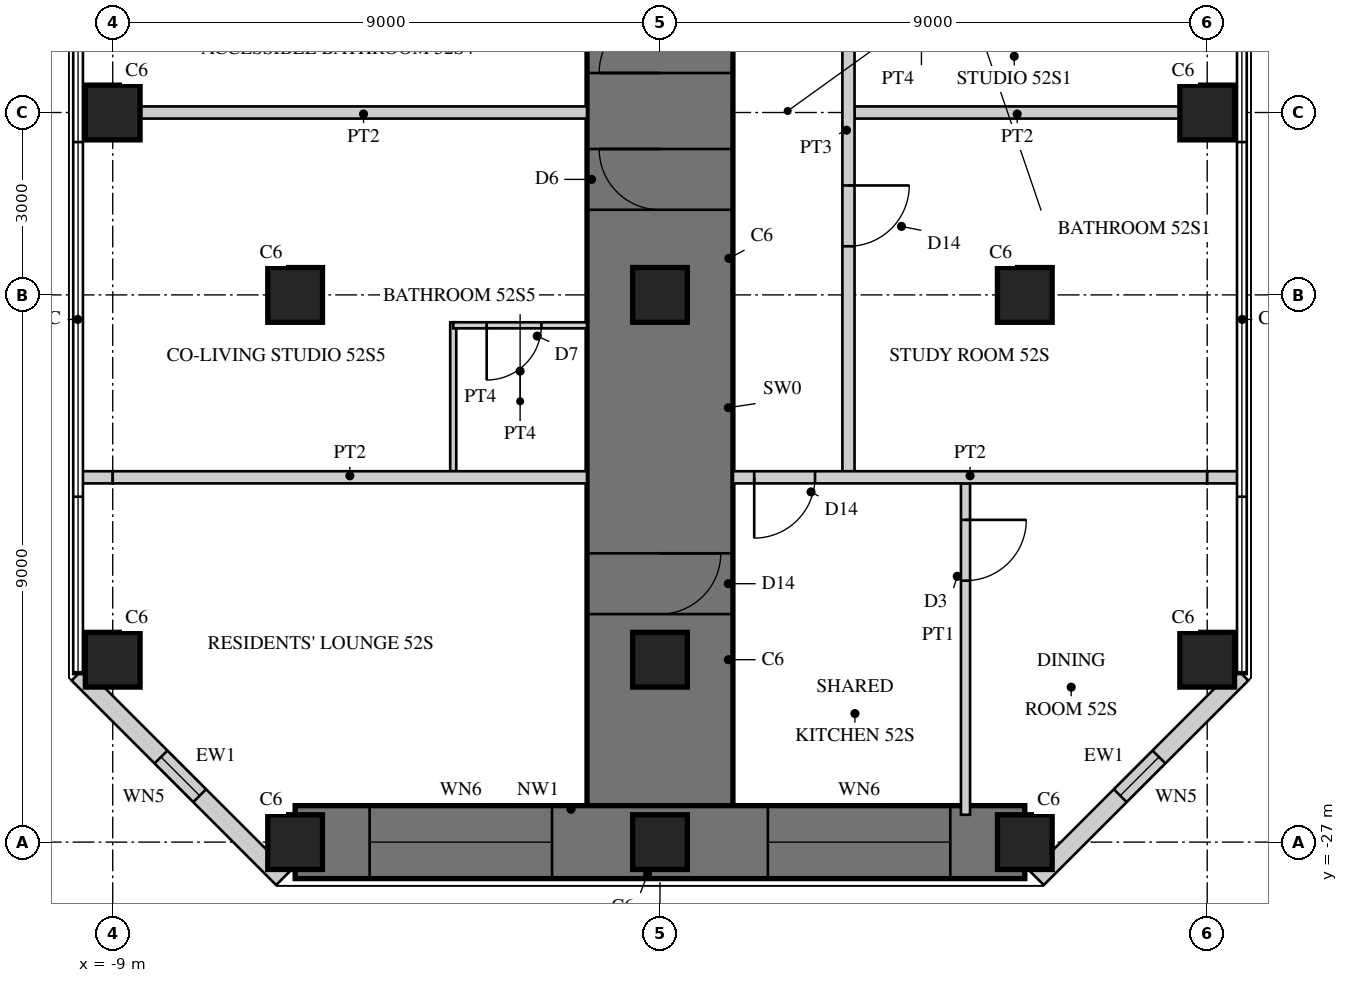
"""IFC4 building model, lengths in metres.
Left out: names, types, materials, properties, quantities, classifications, styles, units other than length and angle.
Written with IfcOpenShell. Run it as: python <this file> out.ifc"""

import sys

from ifc_helpers import new_model, si_unit, direction, frame, frame_2d, origin, origin_2d, place, context, subcontext, project, spatial, rectangle, hollow_rectangle, extrude, element, fill, save


model = new_model("IFC4")
c1 = context("Model", 3, precision=1e-05, world=origin(), true_north=direction((0.0, 1.0)))
c2 = subcontext(c1, "Body", "Model", "MODEL_VIEW")
j1 = project(units=[si_unit("LENGTHUNIT", "METRE"), si_unit("PLANEANGLEUNIT", "RADIAN")], contexts=[c1])
p1 = place(None, origin())
s1 = spatial("IfcSite", under=j1, at=p1, CompositionType="ELEMENT")
p2 = place(p1, origin())
s2 = spatial("IfcBuilding", under=s1, at=p2, CompositionType="ELEMENT")
p3 = place(p2, frame((0.0, 0.0, 206.9)))
s3 = spatial("IfcBuildingStorey", under=s2, at=p3, CompositionType="ELEMENT", Elevation=206.9)
p4 = place(p3, frame((0.0, -13.05, 0.0), z_axis=(0.0, 0.0, 1.0), x_axis=(0.0, -1.0, 0.0)))
e1 = element("IfcWall", 1, at=p4, inside=s3, PredefinedType="SHEAR", context=c2, shape_type="SweptSolid", body=[
    extrude(rectangle(XDim=13.95, YDim=2.4, at=frame_2d((6.975, 0.0))), origin(), (0.0, 0.0, 1.0), 3.4),
])
p5 = place(p4, frame((0.3, 0.0, 0.0)))
e2 = element("IfcOpeningElement", 2, at=p5, cuts=e1, PredefinedType="OPENING", context=c2, shape_type="SweptSolid", body=[
    extrude(rectangle(XDim=1.0, YDim=2.15, at=frame_2d((0.5, 1.075))), frame((0.0, 1.21, 0.0), z_axis=(0.0, -1.0, 0.0), x_axis=(1.0, 0.0, 0.0)), (0.0, 0.0, 1.0), 2.42),
])
p6 = place(p4, frame((2.55, 0.0, 0.0)))
e3 = element("IfcOpeningElement", 3, at=p6, cuts=e1, PredefinedType="OPENING", context=c2, shape_type="SweptSolid", body=[
    extrude(rectangle(XDim=1.0, YDim=2.15, at=frame_2d((0.5, 1.075))), frame((0.0, 1.21, 0.0), z_axis=(0.0, -1.0, 0.0), x_axis=(1.0, 0.0, 0.0)), (0.0, 0.0, 1.0), 2.42),
])
p7 = place(p4, frame((9.2, 0.0, 0.0)))
e4 = element("IfcOpeningElement", 4, at=p7, cuts=e1, PredefinedType="OPENING", context=c2, shape_type="SweptSolid", body=[
    extrude(rectangle(XDim=1.0, YDim=2.2, at=frame_2d((0.5, 1.1))), frame((0.0, 1.21, 0.0), z_axis=(0.0, -1.0, 0.0), x_axis=(1.0, 0.0, 0.0)), (0.0, 0.0, 1.0), 2.42),
])
p8 = place(p3, frame((-6.0, -27.0, 0.0), z_axis=(0.0, 0.0, 1.0), x_axis=(1.0, 0.0, 0.0)))
e5 = element("IfcWall", 5, at=p8, inside=s3, PredefinedType="SHEAR", context=c2, shape_type="SweptSolid", body=[
    extrude(rectangle(XDim=12.0, YDim=1.2, at=frame_2d((6.0, 0.0))), origin(), (0.0, 0.0, 1.0), 3.4),
])
p9 = place(p8, frame((1.225, 0.0, 0.6)))
e6 = element("IfcOpeningElement", 6, at=p9, cuts=e5, PredefinedType="OPENING", context=c2, shape_type="SweptSolid", body=[
    extrude(rectangle(XDim=3.0, YDim=2.4, at=frame_2d((1.5, 1.2))), frame((0.0, 0.61, 0.0), z_axis=(0.0, -1.0, 0.0), x_axis=(1.0, 0.0, 0.0)), (0.0, 0.0, 1.0), 1.22),
])
p10 = place(p8, frame((7.775, 0.0, 0.6)))
e7 = element("IfcOpeningElement", 7, at=p10, cuts=e5, PredefinedType="OPENING", context=c2, shape_type="SweptSolid", body=[
    extrude(rectangle(XDim=3.0, YDim=2.4, at=frame_2d((1.5, 1.2))), frame((0.0, 0.61, 0.0), z_axis=(0.0, -1.0, 0.0), x_axis=(1.0, 0.0, 0.0)), (0.0, 0.0, 1.0), 1.22),
])
for number, where, z_axis, x_axis in (
    (8, (-9.0, -15.0, 0.0), (0.0, 0.0, 1.0), (1.0, 0.0, 0.0)),
    (9, (-9.0, -24.0, 0.0), (0.0, 0.0, 1.0), (1.0, 0.0, 0.0)),
    (10, (9.0, -15.0, 0.0), (0.0, 0.0, 1.0), (1.0, 0.0, 0.0)),
    (11, (9.0, -24.0, 0.0), (0.0, 0.0, 1.0), (1.0, 0.0, 0.0)),
    (12, (-6.0, -27.0, 0.0), (0.0, 0.0, 1.0), (1.0, 0.0, 0.0)),
    (13, (0.0, -27.0, 0.0), (0.0, 0.0, 1.0), (1.0, 0.0, 0.0)),
    (14, (6.0, -27.0, 0.0), (0.0, 0.0, 1.0), (1.0, 0.0, 0.0)),
    (15, (-6.0, -18.0, 0.0), (0.0, 0.0, 1.0), (1.0, 0.0, 0.0)),
    (16, (0.0, -18.0, 0.0), (0.0, 0.0, 1.0), (1.0, 0.0, 0.0)),
    (17, (6.0, -18.0, 0.0), (0.0, 0.0, 1.0), (1.0, 0.0, 0.0)),
    (18, (0.0, -24.0, 0.0), (0.0, 0.0, 1.0), (1.0, 0.0, 0.0)),
):
    element("IfcColumn", number, at=place(p3, frame(where, z_axis=z_axis, x_axis=x_axis)), inside=s3, PredefinedType="COLUMN", context=c2, shape_type="SweptSolid", body=[
        extrude(rectangle(XDim=0.9, YDim=0.9, at=origin_2d()), origin(), (0.0, 0.0, 1.0), 3.4),
    ])
p11 = place(p3, frame((-9.57, -24.236, 0.0), z_axis=(0.0, 0.0, 1.0), x_axis=(0.707106781187, -0.707106781187, 0.0)))
e19 = element("IfcWall", 19, at=p11, inside=s3, PredefinedType="SOLIDWALL", context=c2, shape_type="SweptSolid", body=[
    extrude(rectangle(XDim=4.757, YDim=0.3, at=frame_2d((2.379, 0.0))), origin(), (0.0, 0.0, 1.0), 3.22),
])
p12 = place(p11, frame((1.929, 0.0, 0.3)))
e20 = element("IfcOpeningElement", 20, at=p12, cuts=e19, PredefinedType="OPENING", context=c2, shape_type="SweptSolid", body=[
    extrude(rectangle(XDim=0.9, YDim=2.4, at=frame_2d((0.45, 1.2))), frame((0.0, 0.16, 0.0), z_axis=(0.0, -1.0, 0.0), x_axis=(1.0, 0.0, 0.0)), (0.0, 0.0, 1.0), 0.32),
])
p13 = place(p3, frame((6.206, -27.6, 0.0), z_axis=(0.0, 0.0, 1.0), x_axis=(0.707106781187, 0.707106781187, 0.0)))
e21 = element("IfcWall", 21, at=p13, inside=s3, PredefinedType="SOLIDWALL", context=c2, shape_type="SweptSolid", body=[
    extrude(rectangle(XDim=4.757, YDim=0.3, at=frame_2d((2.379, 0.0))), origin(), (0.0, 0.0, 1.0), 3.22),
])
p14 = place(p13, frame((1.929, 0.0, 0.3)))
e22 = element("IfcOpeningElement", 22, at=p14, cuts=e21, PredefinedType="OPENING", context=c2, shape_type="SweptSolid", body=[
    extrude(rectangle(XDim=0.9, YDim=2.4, at=frame_2d((0.45, 1.2))), frame((0.0, 0.16, 0.0), z_axis=(0.0, -1.0, 0.0), x_axis=(1.0, 0.0, 0.0)), (0.0, 0.0, 1.0), 0.32),
])
p15 = place(p3, frame((3.2, -15.0, 0.0), z_axis=(0.0, 0.0, 1.0), x_axis=(1.0, 0.0, 0.0)))
e23 = element("IfcWall", 23, at=p15, inside=s3, PredefinedType="SOLIDWALL", context=c2, shape_type="SweptSolid", body=[
    extrude(rectangle(XDim=5.35, YDim=0.2, at=frame_2d((2.675, 0.0))), origin(), (0.0, 0.0, 1.0), 2.47),
])
p16 = place(p3, frame((-8.55, -15.0, 0.0), z_axis=(0.0, 0.0, 1.0), x_axis=(1.0, 0.0, 0.0)))
e24 = element("IfcWall", 24, at=p16, inside=s3, PredefinedType="SOLIDWALL", context=c2, shape_type="SweptSolid", body=[
    extrude(rectangle(XDim=7.35, YDim=0.2, at=frame_2d((3.675, 0.0))), origin(), (0.0, 0.0, 1.0), 2.47),
])
p17 = place(p3, frame((-3.4, -18.45, 0.0), z_axis=(0.0, 0.0, 1.0), x_axis=(0.0, -1.0, 0.0)))
e25 = element("IfcWall", 25, at=p17, inside=s3, PredefinedType="PARTITIONING", context=c2, shape_type="SweptSolid", body=[
    extrude(rectangle(XDim=2.45, YDim=0.1, at=frame_2d((1.225, 0.0))), origin(), (0.0, 0.0, 1.0), 3.22),
])
p18 = place(p3, frame((-3.4, -18.5, 0.0), z_axis=(0.0, 0.0, 1.0), x_axis=(1.0, 0.0, 0.0)))
e26 = element("IfcWall", 26, at=p18, inside=s3, PredefinedType="PARTITIONING", context=c2, shape_type="SweptSolid", body=[
    extrude(rectangle(XDim=2.2, YDim=0.1, at=frame_2d((1.1, 0.0))), origin(), (0.0, 0.0, 1.0), 3.22),
])
p19 = place(p18, frame((0.55, 0.0, 0.0)))
e27 = element("IfcOpeningElement", 27, at=p19, cuts=e26, PredefinedType="OPENING", context=c2, shape_type="SweptSolid", body=[
    extrude(rectangle(XDim=0.9, YDim=2.1, at=frame_2d((0.45, 1.05))), frame((0.0, 0.06, 0.0), z_axis=(0.0, -1.0, 0.0), x_axis=(1.0, 0.0, 0.0)), (0.0, 0.0, 1.0), 0.12),
])
p20 = place(p3, frame((3.1, -9.55, 0.0), z_axis=(0.0, 0.0, 1.0), x_axis=(0.0, -1.0, 0.0)))
e28 = element("IfcWall", 28, at=p20, inside=s3, PredefinedType="SOLIDWALL", context=c2, shape_type="SweptSolid", body=[
    extrude(rectangle(XDim=11.45, YDim=0.2, at=frame_2d((5.725, 0.0))), origin(), (0.0, 0.0, 1.0), 3.22),
])
p21 = place(p20, frame((3.4, 0.0, 0.0)))
e29 = element("IfcOpeningElement", 29, at=p21, cuts=e28, PredefinedType="OPENING", context=c2, shape_type="SweptSolid", body=[
    extrude(rectangle(XDim=1.0, YDim=2.15, at=frame_2d((0.5, 1.075))), frame((0.0, 0.11, 0.0), z_axis=(0.0, -1.0, 0.0), x_axis=(1.0, 0.0, 0.0)), (0.0, 0.0, 1.0), 0.22),
])
p22 = place(p20, frame((6.65, 0.0, 0.0)))
e30 = element("IfcOpeningElement", 30, at=p22, cuts=e28, PredefinedType="OPENING", context=c2, shape_type="SweptSolid", body=[
    extrude(rectangle(XDim=1.0, YDim=2.2, at=frame_2d((0.5, 1.1))), frame((0.0, 0.11, 0.0), z_axis=(0.0, -1.0, 0.0), x_axis=(1.0, 0.0, 0.0)), (0.0, 0.0, 1.0), 0.22),
])
p23 = place(p3, frame((5.025, -21.1, 0.0), z_axis=(0.0, 0.0, 1.0), x_axis=(0.0, -1.0, 0.0)))
e31 = element("IfcWall", 31, at=p23, inside=s3, PredefinedType="PARTITIONING", context=c2, shape_type="SweptSolid", body=[
    extrude(rectangle(XDim=5.45, YDim=0.15, at=frame_2d((2.725, 0.0))), origin(), (0.0, 0.0, 1.0), 3.22),
])
p24 = place(p23, frame((0.6, 0.0, 0.0)))
e32 = element("IfcOpeningElement", 32, at=p24, cuts=e31, PredefinedType="OPENING", context=c2, shape_type="SweptSolid", body=[
    extrude(rectangle(XDim=1.0, YDim=2.1, at=frame_2d((0.5, 1.05))), frame((0.0, 0.085, 0.0), z_axis=(0.0, -1.0, 0.0), x_axis=(1.0, 0.0, 0.0)), (0.0, 0.0, 1.0), 0.17),
])
p25 = place(p3, frame((-9.53, -21.0, 0.0), z_axis=(0.0, 0.0, 1.0), x_axis=(1.0, 0.0, 0.0)))
e33 = element("IfcWall", 33, at=p25, inside=s3, PredefinedType="SOLIDWALL", context=c2, shape_type="SweptSolid", body=[
    extrude(rectangle(XDim=0.53, YDim=0.2, at=frame_2d((0.265, 0.0))), origin(), (0.0, 0.0, 1.0), 3.22),
])
p26 = place(p3, frame((-9.0, -21.0, 0.0), z_axis=(0.0, 0.0, 1.0), x_axis=(1.0, 0.0, 0.0)))
e34 = element("IfcWall", 34, at=p26, inside=s3, PredefinedType="SOLIDWALL", context=c2, shape_type="SweptSolid", body=[
    extrude(rectangle(XDim=7.8, YDim=0.2, at=frame_2d((3.9, 0.0))), origin(), (0.0, 0.0, 1.0), 2.62),
])
p27 = place(p3, frame((1.2, -21.0, 0.0), z_axis=(0.0, 0.0, 1.0), x_axis=(1.0, 0.0, 0.0)))
e35 = element("IfcWall", 35, at=p27, inside=s3, PredefinedType="SOLIDWALL", context=c2, shape_type="SweptSolid", body=[
    extrude(rectangle(XDim=7.8, YDim=0.2, at=frame_2d((3.9, 0.0))), origin(), (0.0, 0.0, 1.0), 2.62),
])
p28 = place(p27, frame((0.35, 0.0, 0.0)))
e36 = element("IfcOpeningElement", 36, at=p28, cuts=e35, PredefinedType="OPENING", context=c2, shape_type="SweptSolid", body=[
    extrude(rectangle(XDim=1.0, YDim=2.2, at=frame_2d((0.5, 1.1))), frame((0.0, 0.11, 0.0), z_axis=(0.0, -1.0, 0.0), x_axis=(1.0, 0.0, 0.0)), (0.0, 0.0, 1.0), 0.22),
])
p29 = place(p3, frame((9.0, -21.0, 0.0), z_axis=(0.0, 0.0, 1.0), x_axis=(1.0, 0.0, 0.0)))
e37 = element("IfcWall", 37, at=p29, inside=s3, PredefinedType="SOLIDWALL", context=c2, shape_type="SweptSolid", body=[
    extrude(rectangle(XDim=0.53, YDim=0.2, at=frame_2d((0.265, 0.0))), origin(), (0.0, 0.0, 1.0), 3.22),
])
p30 = place(p12, origin())
e38 = element("IfcWindow", 38, at=p30, inside=s3, PartitioningType="SINGLE_PANEL", PredefinedType="WINDOW", context=c2, shape_type="SweptSolid", body=[
    extrude(hollow_rectangle(XDim=0.9, YDim=2.4, WallThickness=0.06, at=frame_2d((0.45, 1.2))), frame((0.0, 0.03, 0.0), z_axis=(0.0, -1.0, 0.0), x_axis=(1.0, 0.0, 0.0)), (0.0, 0.0, 1.0), 0.06),
    extrude(rectangle(XDim=0.779, YDim=2.279, at=frame_2d((0.45, 1.2))), frame((0.0, 0.03, 0.0), z_axis=(0.0, -1.0, 0.0), x_axis=(1.0, 0.0, 0.0)), (0.0, 0.0, 1.0), 0.06),
])
fill(e20, e38)
p31 = place(p9, origin())
e39 = element("IfcWindow", 39, at=p31, inside=s3, PartitioningType="SINGLE_PANEL", PredefinedType="WINDOW", context=c2, shape_type="SweptSolid", body=[
    extrude(hollow_rectangle(XDim=3.0, YDim=2.4, WallThickness=0.06, at=frame_2d((1.5, 1.2))), frame((0.0, 0.03, 0.0), z_axis=(0.0, -1.0, 0.0), x_axis=(1.0, 0.0, 0.0)), (0.0, 0.0, 1.0), 0.06),
    extrude(rectangle(XDim=2.879, YDim=2.279, at=frame_2d((1.5, 1.2))), frame((0.0, 0.03, 0.0), z_axis=(0.0, -1.0, 0.0), x_axis=(1.0, 0.0, 0.0)), (0.0, 0.0, 1.0), 0.06),
])
fill(e6, e39)
p32 = place(p10, origin())
e40 = element("IfcWindow", 40, at=p32, inside=s3, PartitioningType="SINGLE_PANEL", PredefinedType="WINDOW", context=c2, shape_type="SweptSolid", body=[
    extrude(hollow_rectangle(XDim=3.0, YDim=2.4, WallThickness=0.06, at=frame_2d((1.5, 1.2))), frame((0.0, 0.03, 0.0), z_axis=(0.0, -1.0, 0.0), x_axis=(1.0, 0.0, 0.0)), (0.0, 0.0, 1.0), 0.06),
    extrude(rectangle(XDim=2.879, YDim=2.279, at=frame_2d((1.5, 1.2))), frame((0.0, 0.03, 0.0), z_axis=(0.0, -1.0, 0.0), x_axis=(1.0, 0.0, 0.0)), (0.0, 0.0, 1.0), 0.06),
])
fill(e7, e40)
p33 = place(p14, origin())
e41 = element("IfcWindow", 41, at=p33, inside=s3, PartitioningType="SINGLE_PANEL", PredefinedType="WINDOW", context=c2, shape_type="SweptSolid", body=[
    extrude(hollow_rectangle(XDim=0.9, YDim=2.4, WallThickness=0.06, at=frame_2d((0.45, 1.2))), frame((0.0, 0.03, 0.0), z_axis=(0.0, -1.0, 0.0), x_axis=(1.0, 0.0, 0.0)), (0.0, 0.0, 1.0), 0.06),
    extrude(rectangle(XDim=0.779, YDim=2.279, at=frame_2d((0.45, 1.2))), frame((0.0, 0.03, 0.0), z_axis=(0.0, -1.0, 0.0), x_axis=(1.0, 0.0, 0.0)), (0.0, 0.0, 1.0), 0.06),
])
fill(e22, e41)
p34 = place(p19, frame((0.9, 0.0, 0.0), z_axis=(0.0, 0.0, 1.0), x_axis=(-1.0, 0.0, 0.0)))
e42 = element("IfcDoor", 42, at=p34, inside=s3, OperationType="SINGLE_SWING_RIGHT", PredefinedType="DOOR", context=c2, shape_type="SweptSolid", body=[
    extrude(rectangle(XDim=0.9, YDim=2.1, at=frame_2d((0.45, 1.05))), frame((0.0, 0.025, 0.0), z_axis=(0.0, -1.0, 0.0), x_axis=(1.0, 0.0, 0.0)), (0.0, 0.0, 1.0), 0.05),
])
fill(e27, e42)
p35 = place(p22, origin())
e43 = element("IfcDoor", 43, at=p35, inside=s3, OperationType="SINGLE_SWING_LEFT", PredefinedType="DOOR", context=c2, shape_type="SweptSolid", body=[
    extrude(rectangle(XDim=1.0, YDim=2.2, at=frame_2d((0.5, 1.1))), frame((0.0, 0.025, 0.0), z_axis=(0.0, -1.0, 0.0), x_axis=(1.0, 0.0, 0.0)), (0.0, 0.0, 1.0), 0.05),
])
fill(e30, e43)
p36 = place(p24, origin())
e44 = element("IfcDoor", 44, at=p36, inside=s3, OperationType="SINGLE_SWING_LEFT", PredefinedType="DOOR", context=c2, shape_type="SweptSolid", body=[
    extrude(rectangle(XDim=1.0, YDim=2.1, at=frame_2d((0.5, 1.05))), frame((0.0, 0.025, 0.0), z_axis=(0.0, -1.0, 0.0), x_axis=(1.0, 0.0, 0.0)), (0.0, 0.0, 1.0), 0.05),
])
fill(e32, e44)
p37 = place(p28, frame((1.0, 0.0, 0.0), z_axis=(0.0, 0.0, 1.0), x_axis=(-1.0, 0.0, 0.0)))
e45 = element("IfcDoor", 45, at=p37, inside=s3, OperationType="SINGLE_SWING_RIGHT", PredefinedType="DOOR", context=c2, shape_type="SweptSolid", body=[
    extrude(rectangle(XDim=1.0, YDim=2.2, at=frame_2d((0.5, 1.1))), frame((0.0, 0.025, 0.0), z_axis=(0.0, -1.0, 0.0), x_axis=(1.0, 0.0, 0.0)), (0.0, 0.0, 1.0), 0.05),
])
fill(e36, e45)
p38 = place(p5, frame((1.0, 0.0, 0.0), z_axis=(0.0, 0.0, 1.0), x_axis=(-1.0, 0.0, 0.0)))
e46 = element("IfcDoor", 46, at=p38, inside=s3, OperationType="SINGLE_SWING_LEFT", PredefinedType="DOOR", context=c2, shape_type="SweptSolid", body=[
    extrude(rectangle(XDim=1.0, YDim=2.15, at=frame_2d((0.5, 1.075))), frame((0.0, 0.025, 0.0), z_axis=(0.0, -1.0, 0.0), x_axis=(1.0, 0.0, 0.0)), (0.0, 0.0, 1.0), 0.05),
])
fill(e2, e46)
p39 = place(p6, frame((1.0, 0.0, 0.0), z_axis=(0.0, 0.0, 1.0), x_axis=(-1.0, 0.0, 0.0)))
e47 = element("IfcDoor", 47, at=p39, inside=s3, OperationType="SINGLE_SWING_RIGHT", PredefinedType="DOOR", context=c2, shape_type="SweptSolid", body=[
    extrude(rectangle(XDim=1.0, YDim=2.15, at=frame_2d((0.5, 1.075))), frame((0.0, 0.025, 0.0), z_axis=(0.0, -1.0, 0.0), x_axis=(1.0, 0.0, 0.0)), (0.0, 0.0, 1.0), 0.05),
])
fill(e3, e47)
p40 = place(p7, origin())
e48 = element("IfcDoor", 48, at=p40, inside=s3, OperationType="SINGLE_SWING_LEFT", PredefinedType="DOOR", context=c2, shape_type="SweptSolid", body=[
    extrude(rectangle(XDim=1.0, YDim=2.2, at=frame_2d((0.5, 1.1))), frame((0.0, 0.025, 0.0), z_axis=(0.0, -1.0, 0.0), x_axis=(1.0, 0.0, 0.0)), (0.0, 0.0, 1.0), 0.05),
])
fill(e4, e48)
save(model, sys.argv[1])
